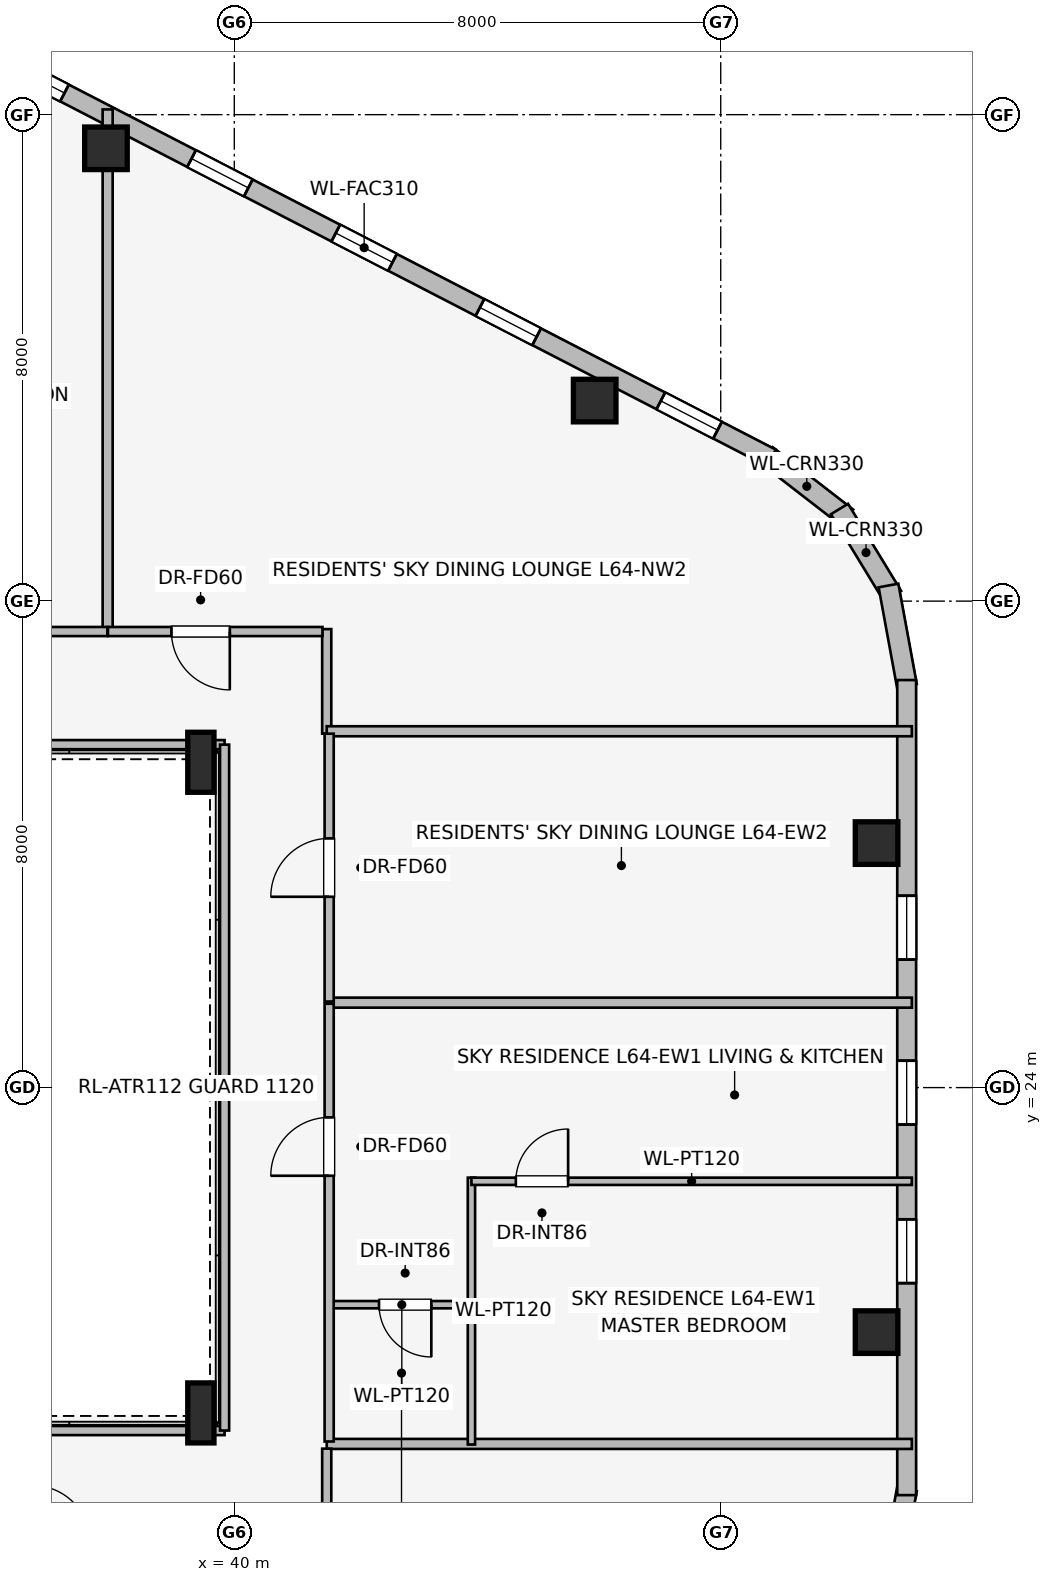
"""IFC4 building model, lengths in metres.
Left out: names, types, materials, properties, quantities, classifications, styles, units other than length and angle.
Written with IfcOpenShell. Run it as: python <this file> out.ifc"""

import sys

from ifc_helpers import new_model, si_unit, direction, frame, frame_2d, origin, origin_2d, place, context, subcontext, project, spatial, rectangle, i_section, extrude, element, fill, save


model = new_model("IFC4")
c1 = context("Model", 3, precision=1e-05, world=origin(), true_north=direction((0.0, 1.0)))
c2 = subcontext(c1, "Body", "Model", "MODEL_VIEW")
j1 = project(units=[si_unit("LENGTHUNIT", "METRE"), si_unit("PLANEANGLEUNIT", "RADIAN")], contexts=[c1])
p1 = place(None, origin())
s1 = spatial("IfcSite", under=j1, at=p1, CompositionType="ELEMENT")
p2 = place(p1, origin())
s2 = spatial("IfcBuilding", under=s1, at=p2, CompositionType="ELEMENT")
p3 = place(p2, frame((0.0, 0.0, 234.8)))
s3 = spatial("IfcBuildingStorey", under=s2, at=p3, CompositionType="ELEMENT", Elevation=234.8)
for number, where, z_axis, x_axis in (
    (1, (45.927, 35.298, 0.0), (0.0, 0.0, 1.0), (1.0, 0.0, 0.0)),
    (2, (37.889, 39.447, 0.0), (0.0, 0.0, 1.0), (1.0, 0.0, 0.0)),
    (3, (50.563, 19.979, 0.0), (0.0, 0.0, 1.0), (1.0, 0.0, 0.0)),
    (4, (50.563, 28.021, 0.0), (0.0, 0.0, 1.0), (1.0, 0.0, 0.0)),
):
    element("IfcColumn", number, at=place(p3, frame(where, z_axis=z_axis, x_axis=x_axis)), inside=s3, PredefinedType="COLUMN", context=c2, shape_type="SweptSolid", body=[
        extrude(rectangle(XDim=0.7, YDim=0.7, at=origin_2d()), origin(), (0.0, 0.0, 1.0), 3.55),
    ])
for number, where, z_axis, x_axis in (
    (5, (39.45, 18.65, 0.0), (0.0, 0.0, 1.0), (1.0, 0.0, 0.0)),
    (6, (39.45, 29.35, 0.0), (0.0, 0.0, 1.0), (1.0, 0.0, 0.0)),
):
    element("IfcColumn", number, at=place(p3, frame(where, z_axis=z_axis, x_axis=x_axis)), inside=s3, PredefinedType="COLUMN", context=c2, shape_type="SweptSolid", body=[
        extrude(i_section(OverallWidth=0.431, OverallDepth=0.987, WebThickness=0.034, FlangeThickness=0.062, at=origin_2d()), origin(), (0.0, 0.0, 1.0), 3.55),
    ])
p4 = place(p3, frame((48.753, 34.401, 0.0), z_axis=(0.0, 0.0, 1.0), x_axis=(0.790691856293, -0.61221433207, 0.0)))
e7 = element("IfcWall", 7, at=p4, inside=s3, PredefinedType="STANDARD", context=c2, shape_type="SweptSolid", body=[
    extrude(rectangle(XDim=1.676, YDim=0.33, at=frame_2d((0.838, 0.0))), origin(), (0.0, 0.0, 1.0), 3.26),
])
p5 = place(p3, frame((49.953, 33.515, 0.0), z_axis=(0.0, 0.0, 1.0), x_axis=(0.520325409202, -0.853968072318, 0.0)))
e8 = element("IfcWall", 8, at=p5, inside=s3, PredefinedType="STANDARD", context=c2, shape_type="SweptSolid", body=[
    extrude(rectangle(XDim=1.678, YDim=0.33, at=frame_2d((0.839, 0.0))), origin(), (0.0, 0.0, 1.0), 3.26),
])
p6 = place(p3, frame((50.759, 32.257, 0.0), z_axis=(0.0, 0.0, 1.0), x_axis=(0.180691763044, -0.983539773862, 0.0)))
e9 = element("IfcWall", 9, at=p6, inside=s3, PredefinedType="STANDARD", context=c2, shape_type="SweptSolid", body=[
    extrude(rectangle(XDim=1.677, YDim=0.33, at=frame_2d((0.838, 0.0))), origin(), (0.0, 0.0, 1.0), 3.26),
])
p7 = place(p3, frame((35.437, 41.27, 0.0), z_axis=(0.0, 0.0, 1.0), x_axis=(0.888581481622, -0.458718814218, 0.0)))
e10 = element("IfcWall", 10, at=p7, inside=s3, PredefinedType="STANDARD", context=c2, shape_type="SweptSolid", body=[
    extrude(rectangle(XDim=15.077, YDim=0.31, at=frame_2d((7.539, 0.0))), origin(), (0.0, 0.0, 1.0), 3.26),
])
p8 = place(p7, frame((0.942, 0.0, 0.75)))
e11 = element("IfcOpeningElement", 11, at=p8, cuts=e10, PredefinedType="OPENING", context=c2, shape_type="SweptSolid", body=[
    extrude(rectangle(XDim=1.05, YDim=1.4, at=frame_2d((0.525, 0.7))), frame((0.0, 0.165, 0.0), z_axis=(0.0, -1.0, 0.0), x_axis=(1.0, 0.0, 0.0)), (0.0, 0.0, 1.0), 0.33),
])
p9 = place(p7, frame((4.344, 0.0, 0.75)))
e12 = element("IfcOpeningElement", 12, at=p9, cuts=e10, PredefinedType="OPENING", context=c2, shape_type="SweptSolid", body=[
    extrude(rectangle(XDim=1.05, YDim=1.4, at=frame_2d((0.525, 0.7))), frame((0.0, 0.165, 0.0), z_axis=(0.0, -1.0, 0.0), x_axis=(1.0, 0.0, 0.0)), (0.0, 0.0, 1.0), 0.33),
])
p10 = place(p7, frame((7.013, 0.0, 0.75)))
e13 = element("IfcOpeningElement", 13, at=p10, cuts=e10, PredefinedType="OPENING", context=c2, shape_type="SweptSolid", body=[
    extrude(rectangle(XDim=1.05, YDim=1.4, at=frame_2d((0.525, 0.7))), frame((0.0, 0.165, 0.0), z_axis=(0.0, -1.0, 0.0), x_axis=(1.0, 0.0, 0.0)), (0.0, 0.0, 1.0), 0.33),
])
p11 = place(p7, frame((9.681, 0.0, 0.75)))
e14 = element("IfcOpeningElement", 14, at=p11, cuts=e10, PredefinedType="OPENING", context=c2, shape_type="SweptSolid", body=[
    extrude(rectangle(XDim=1.05, YDim=1.4, at=frame_2d((0.525, 0.7))), frame((0.0, 0.165, 0.0), z_axis=(0.0, -1.0, 0.0), x_axis=(1.0, 0.0, 0.0)), (0.0, 0.0, 1.0), 0.33),
])
p12 = place(p7, frame((13.029, 0.0, 0.75)))
e15 = element("IfcOpeningElement", 15, at=p12, cuts=e10, PredefinedType="OPENING", context=c2, shape_type="SweptSolid", body=[
    extrude(rectangle(XDim=1.05, YDim=1.4, at=frame_2d((0.525, 0.7))), frame((0.0, 0.165, 0.0), z_axis=(0.0, -1.0, 0.0), x_axis=(1.0, 0.0, 0.0)), (0.0, 0.0, 1.0), 0.33),
])
p13 = place(p3, frame((51.062, 17.392, 0.0), z_axis=(0.0, 0.0, 1.0), x_axis=(-0.180691763044, -0.983539773862, 0.0)))
e16 = element("IfcWall", 16, at=p13, inside=s3, PredefinedType="STANDARD", context=c2, shape_type="SweptSolid", body=[
    extrude(rectangle(XDim=1.677, YDim=0.33, at=frame_2d((0.838, 0.0))), origin(), (0.0, 0.0, 1.0), 3.26),
])
p14 = place(p3, frame((51.058, 30.702, 0.0), z_axis=(0.0, 0.0, 1.0), x_axis=(0.0, -1.0, 0.0)))
e17 = element("IfcWall", 17, at=p14, inside=s3, PredefinedType="STANDARD", context=c2, shape_type="SweptSolid", body=[
    extrude(rectangle(XDim=13.404, YDim=0.31, at=frame_2d((6.702, 0.0))), origin(), (0.0, 0.0, 1.0), 3.26),
])
p15 = place(p14, frame((3.547, 0.0, 0.75)))
e18 = element("IfcOpeningElement", 18, at=p15, cuts=e17, PredefinedType="OPENING", context=c2, shape_type="SweptSolid", body=[
    extrude(rectangle(XDim=1.05, YDim=1.4, at=frame_2d((0.525, 0.7))), frame((0.0, 0.165, 0.0), z_axis=(0.0, -1.0, 0.0), x_axis=(1.0, 0.0, 0.0)), (0.0, 0.0, 1.0), 0.33),
])
p16 = place(p14, frame((6.26, 0.0, 0.75)))
e19 = element("IfcOpeningElement", 19, at=p16, cuts=e17, PredefinedType="OPENING", context=c2, shape_type="SweptSolid", body=[
    extrude(rectangle(XDim=1.05, YDim=1.4, at=frame_2d((0.525, 0.7))), frame((0.0, 0.165, 0.0), z_axis=(0.0, -1.0, 0.0), x_axis=(1.0, 0.0, 0.0)), (0.0, 0.0, 1.0), 0.33),
])
p17 = place(p14, frame((8.868, 0.0, 0.75)))
e20 = element("IfcOpeningElement", 20, at=p17, cuts=e17, PredefinedType="OPENING", context=c2, shape_type="SweptSolid", body=[
    extrude(rectangle(XDim=1.05, YDim=1.4, at=frame_2d((0.525, 0.7))), frame((0.0, 0.165, 0.0), z_axis=(0.0, -1.0, 0.0), x_axis=(1.0, 0.0, 0.0)), (0.0, 0.0, 1.0), 0.33),
])
p18 = place(p3, frame((27.675, 18.36, 0.0), z_axis=(0.0, 0.0, 1.0), x_axis=(1.0, 0.0, 0.0)))
e21 = element("IfcWall", 21, at=p18, inside=s3, PredefinedType="PARTITIONING", context=c2, shape_type="SweptSolid", body=[
    extrude(rectangle(XDim=12.165, YDim=0.15, at=frame_2d((6.083, 0.0))), origin(), (0.0, 0.0, 1.0), 2.401),
])
p19 = place(p3, frame((39.84, 29.64, 0.0), z_axis=(0.0, 0.0, 1.0), x_axis=(-1.0, 0.0, 0.0)))
e22 = element("IfcWall", 22, at=p19, inside=s3, PredefinedType="PARTITIONING", context=c2, shape_type="SweptSolid", body=[
    extrude(rectangle(XDim=12.203, YDim=0.15, at=frame_2d((6.102, 0.0))), origin(), (0.0, 0.0, 1.0), 2.401),
])
p20 = place(p3, frame((39.84, 18.36, 0.0), z_axis=(0.0, 0.0, 1.0), x_axis=(0.0, 1.0, 0.0)))
e23 = element("IfcWall", 23, at=p20, inside=s3, PredefinedType="PARTITIONING", context=c2, shape_type="SweptSolid", body=[
    extrude(rectangle(XDim=11.28, YDim=0.15, at=frame_2d((5.64, 0.0))), origin(), (0.0, 0.0, 1.0), 3.26),
])
p21 = place(p3, frame((41.52, 29.82, 0.0), z_axis=(0.0, 0.0, 1.0), x_axis=(0.0, 1.0, 0.0)))
e24 = element("IfcWall", 24, at=p21, inside=s3, PredefinedType="PARTITIONING", context=c2, shape_type="SweptSolid", body=[
    extrude(rectangle(XDim=1.72, YDim=0.15, at=frame_2d((0.86, 0.0))), origin(), (0.0, 0.0, 1.0), 3.26),
])
p22 = place(p3, frame((37.917, 31.51, 0.0), z_axis=(0.0, 0.0, 1.0), x_axis=(0.0, 1.0, 0.0)))
e25 = element("IfcWall", 25, at=p22, inside=s3, PredefinedType="PARTITIONING", context=c2, shape_type="SweptSolid", body=[
    extrude(rectangle(XDim=8.576, YDim=0.165, at=frame_2d((4.288, 0.0))), origin(), (0.0, 0.0, 1.0), 2.649),
])
p23 = place(p3, frame((37.912, 31.5, 0.0), z_axis=(0.0, 0.0, 1.0), x_axis=(-1.0, 0.0, 0.0)))
e26 = element("IfcWall", 26, at=p23, inside=s3, PredefinedType="PARTITIONING", context=c2, shape_type="SweptSolid", body=[
    extrude(rectangle(XDim=3.622, YDim=0.15, at=frame_2d((1.811, 0.0))), origin(), (0.0, 0.0, 1.0), 3.26),
])
p24 = place(p23, frame((1.212, 0.0, 0.0)))
e27 = element("IfcOpeningElement", 27, at=p24, cuts=e26, PredefinedType="OPENING", context=c2, shape_type="SweptSolid", body=[
    extrude(rectangle(XDim=0.96, YDim=2.0, at=frame_2d((0.48, 1.0))), frame((0.0, 0.085, 0.0), z_axis=(0.0, -1.0, 0.0), x_axis=(1.0, 0.0, 0.0)), (0.0, 0.0, 1.0), 0.17),
])
p25 = place(p3, frame((41.45, 31.5, 0.0), z_axis=(0.0, 0.0, 1.0), x_axis=(-1.0, 0.0, 0.0)))
e28 = element("IfcWall", 28, at=p25, inside=s3, PredefinedType="PARTITIONING", context=c2, shape_type="SweptSolid", body=[
    extrude(rectangle(XDim=3.528, YDim=0.15, at=frame_2d((1.764, 0.0))), origin(), (0.0, 0.0, 1.0), 3.26),
])
p26 = place(p25, frame((1.524, 0.0, 0.0)))
e29 = element("IfcOpeningElement", 29, at=p26, cuts=e28, PredefinedType="OPENING", context=c2, shape_type="SweptSolid", body=[
    extrude(rectangle(XDim=0.96, YDim=2.0, at=frame_2d((0.48, 1.0))), frame((0.0, 0.085, 0.0), z_axis=(0.0, -1.0, 0.0), x_axis=(1.0, 0.0, 0.0)), (0.0, 0.0, 1.0), 0.17),
])
for number, where, z_axis, x_axis in (
    (30, (41.52, 18.14, 0.0), (0.0, 0.0, 1.0), (1.0, 0.0, 0.0)),
    (31, (41.52, 29.86, 0.0), (0.0, 0.0, 1.0), (1.0, 0.0, 0.0)),
):
    element("IfcWall", number, at=place(p3, frame(where, z_axis=z_axis, x_axis=x_axis)), inside=s3, PredefinedType="PARTITIONING", context=c2, shape_type="SweptSolid", body=[
        extrude(rectangle(XDim=9.623, YDim=0.165, at=frame_2d((4.812, 0.0))), origin(), (0.0, 0.0, 1.0), 3.26),
    ])
p27 = place(p3, frame((41.59, 25.397, 0.0), z_axis=(0.0, 0.0, 1.0), x_axis=(1.0, 0.0, 0.0)))
e32 = element("IfcWall", 32, at=p27, inside=s3, PredefinedType="PARTITIONING", context=c2, shape_type="SweptSolid", body=[
    extrude(rectangle(XDim=9.553, YDim=0.165, at=frame_2d((4.776, 0.0))), origin(), (0.0, 0.0, 1.0), 3.26),
])
p28 = place(p3, frame((43.9, 18.13, 0.0), z_axis=(0.0, 0.0, 1.0), x_axis=(0.0, 1.0, 0.0)))
e33 = element("IfcWall", 33, at=p28, inside=s3, PredefinedType="PARTITIONING", context=c2, shape_type="SweptSolid", body=[
    extrude(rectangle(XDim=4.389, YDim=0.12, at=frame_2d((2.195, 0.0))), origin(), (0.0, 0.0, 1.0), 3.26),
])
p29 = place(p3, frame((43.96, 20.43, 0.0), z_axis=(0.0, 0.0, 1.0), x_axis=(-1.0, 0.0, 0.0)))
e34 = element("IfcWall", 34, at=p29, inside=s3, PredefinedType="PARTITIONING", context=c2, shape_type="SweptSolid", body=[
    extrude(rectangle(XDim=2.41, YDim=0.12, at=frame_2d((1.205, 0.0))), origin(), (0.0, 0.0, 1.0), 3.26),
])
p30 = place(p29, frame((0.72, 0.0, 0.0)))
e35 = element("IfcOpeningElement", 35, at=p30, cuts=e34, PredefinedType="OPENING", context=c2, shape_type="SweptSolid", body=[
    extrude(rectangle(XDim=0.86, YDim=2.0, at=frame_2d((0.43, 1.0))), frame((0.0, 0.07, 0.0), z_axis=(0.0, -1.0, 0.0), x_axis=(1.0, 0.0, 0.0)), (0.0, 0.0, 1.0), 0.14),
])
p31 = place(p3, frame((43.9, 22.459, 0.0), z_axis=(0.0, 0.0, 1.0), x_axis=(1.0, 0.0, 0.0)))
e36 = element("IfcWall", 36, at=p31, inside=s3, PredefinedType="PARTITIONING", context=c2, shape_type="SweptSolid", body=[
    extrude(rectangle(XDim=7.243, YDim=0.12, at=frame_2d((3.622, 0.0))), origin(), (0.0, 0.0, 1.0), 3.26),
])
p32 = place(p31, frame((0.73, 0.0, 0.0)))
e37 = element("IfcOpeningElement", 37, at=p32, cuts=e36, PredefinedType="OPENING", context=c2, shape_type="SweptSolid", body=[
    extrude(rectangle(XDim=0.86, YDim=2.0, at=frame_2d((0.43, 1.0))), frame((0.0, 0.07, 0.0), z_axis=(0.0, -1.0, 0.0), x_axis=(1.0, 0.0, 0.0)), (0.0, 0.0, 1.0), 0.14),
])
p33 = place(p3, frame((41.56, 18.18, 0.0), z_axis=(0.0, 0.0, 1.0), x_axis=(0.0, 1.0, 0.0)))
e38 = element("IfcWall", 38, at=p33, inside=s3, PredefinedType="PARTITIONING", context=c2, shape_type="SweptSolid", body=[
    extrude(rectangle(XDim=7.199, YDim=0.15, at=frame_2d((3.6, 0.0))), origin(), (0.0, 0.0, 1.0), 3.26),
])
p34 = place(p33, frame((4.37, 0.0, 0.0)))
e39 = element("IfcOpeningElement", 39, at=p34, cuts=e38, PredefinedType="OPENING", context=c2, shape_type="SweptSolid", body=[
    extrude(rectangle(XDim=0.96, YDim=2.0, at=frame_2d((0.48, 1.0))), frame((0.0, 0.085, 0.0), z_axis=(0.0, -1.0, 0.0), x_axis=(1.0, 0.0, 0.0)), (0.0, 0.0, 1.0), 0.17),
])
p35 = place(p3, frame((41.56, 25.415, 0.0), z_axis=(0.0, 0.0, 1.0), x_axis=(0.0, 1.0, 0.0)))
e40 = element("IfcWall", 40, at=p35, inside=s3, PredefinedType="PARTITIONING", context=c2, shape_type="SweptSolid", body=[
    extrude(rectangle(XDim=4.405, YDim=0.15, at=frame_2d((2.203, 0.0))), origin(), (0.0, 0.0, 1.0), 3.26),
])
p36 = place(p35, frame((1.723, 0.0, 0.0)))
e41 = element("IfcOpeningElement", 41, at=p36, cuts=e40, PredefinedType="OPENING", context=c2, shape_type="SweptSolid", body=[
    extrude(rectangle(XDim=0.96, YDim=2.0, at=frame_2d((0.48, 1.0))), frame((0.0, 0.085, 0.0), z_axis=(0.0, -1.0, 0.0), x_axis=(1.0, 0.0, 0.0)), (0.0, 0.0, 1.0), 0.17),
])
p37 = place(p3, frame((41.52, 16.46, 0.0), z_axis=(0.0, 0.0, 1.0), x_axis=(0.0, 1.0, 0.0)))
e42 = element("IfcWall", 42, at=p37, inside=s3, PredefinedType="PARTITIONING", context=c2, shape_type="SweptSolid", body=[
    extrude(rectangle(XDim=1.602, YDim=0.15, at=frame_2d((0.801, 0.0))), origin(), (0.0, 0.0, 1.0), 3.26),
])
p38 = place(p8, origin())
e43 = element("IfcWindow", 43, at=p38, inside=s3, PartitioningType="SINGLE_PANEL", PredefinedType="WINDOW", context=c2, shape_type="SweptSolid", body=[
    extrude(rectangle(XDim=1.05, YDim=1.4, at=frame_2d((0.525, 0.7))), frame((0.0, 0.03, 0.0), z_axis=(0.0, -1.0, 0.0), x_axis=(1.0, 0.0, 0.0)), (0.0, 0.0, 1.0), 0.06),
])
fill(e11, e43)
p39 = place(p9, origin())
e44 = element("IfcWindow", 44, at=p39, inside=s3, PartitioningType="SINGLE_PANEL", PredefinedType="WINDOW", context=c2, shape_type="SweptSolid", body=[
    extrude(rectangle(XDim=1.05, YDim=1.4, at=frame_2d((0.525, 0.7))), frame((0.0, 0.03, 0.0), z_axis=(0.0, -1.0, 0.0), x_axis=(1.0, 0.0, 0.0)), (0.0, 0.0, 1.0), 0.06),
])
fill(e12, e44)
p40 = place(p10, origin())
e45 = element("IfcWindow", 45, at=p40, inside=s3, PartitioningType="SINGLE_PANEL", PredefinedType="WINDOW", context=c2, shape_type="SweptSolid", body=[
    extrude(rectangle(XDim=1.05, YDim=1.4, at=frame_2d((0.525, 0.7))), frame((0.0, 0.03, 0.0), z_axis=(0.0, -1.0, 0.0), x_axis=(1.0, 0.0, 0.0)), (0.0, 0.0, 1.0), 0.06),
])
fill(e13, e45)
p41 = place(p11, origin())
e46 = element("IfcWindow", 46, at=p41, inside=s3, PartitioningType="SINGLE_PANEL", PredefinedType="WINDOW", context=c2, shape_type="SweptSolid", body=[
    extrude(rectangle(XDim=1.05, YDim=1.4, at=frame_2d((0.525, 0.7))), frame((0.0, 0.03, 0.0), z_axis=(0.0, -1.0, 0.0), x_axis=(1.0, 0.0, 0.0)), (0.0, 0.0, 1.0), 0.06),
])
fill(e14, e46)
p42 = place(p12, origin())
e47 = element("IfcWindow", 47, at=p42, inside=s3, PartitioningType="SINGLE_PANEL", PredefinedType="WINDOW", context=c2, shape_type="SweptSolid", body=[
    extrude(rectangle(XDim=1.05, YDim=1.4, at=frame_2d((0.525, 0.7))), frame((0.0, 0.03, 0.0), z_axis=(0.0, -1.0, 0.0), x_axis=(1.0, 0.0, 0.0)), (0.0, 0.0, 1.0), 0.06),
])
fill(e15, e47)
p43 = place(p15, origin())
e48 = element("IfcWindow", 48, at=p43, inside=s3, PartitioningType="SINGLE_PANEL", PredefinedType="WINDOW", context=c2, shape_type="SweptSolid", body=[
    extrude(rectangle(XDim=1.05, YDim=1.4, at=frame_2d((0.525, 0.7))), frame((0.0, 0.03, 0.0), z_axis=(0.0, -1.0, 0.0), x_axis=(1.0, 0.0, 0.0)), (0.0, 0.0, 1.0), 0.06),
])
fill(e18, e48)
p44 = place(p16, origin())
e49 = element("IfcWindow", 49, at=p44, inside=s3, PartitioningType="SINGLE_PANEL", PredefinedType="WINDOW", context=c2, shape_type="SweptSolid", body=[
    extrude(rectangle(XDim=1.05, YDim=1.4, at=frame_2d((0.525, 0.7))), frame((0.0, 0.03, 0.0), z_axis=(0.0, -1.0, 0.0), x_axis=(1.0, 0.0, 0.0)), (0.0, 0.0, 1.0), 0.06),
])
fill(e19, e49)
p45 = place(p17, origin())
e50 = element("IfcWindow", 50, at=p45, inside=s3, PartitioningType="SINGLE_PANEL", PredefinedType="WINDOW", context=c2, shape_type="SweptSolid", body=[
    extrude(rectangle(XDim=1.05, YDim=1.4, at=frame_2d((0.525, 0.7))), frame((0.0, 0.03, 0.0), z_axis=(0.0, -1.0, 0.0), x_axis=(1.0, 0.0, 0.0)), (0.0, 0.0, 1.0), 0.06),
])
fill(e20, e50)
p46 = place(p26, origin())
e51 = element("IfcDoor", 51, at=p46, inside=s3, OperationType="SINGLE_SWING_LEFT", PredefinedType="DOOR", context=c2, shape_type="SweptSolid", body=[
    extrude(rectangle(XDim=0.96, YDim=2.0, at=frame_2d((0.48, 1.0))), frame((0.0, 0.025, 0.0), z_axis=(0.0, -1.0, 0.0), x_axis=(1.0, 0.0, 0.0)), (0.0, 0.0, 1.0), 0.05),
])
fill(e29, e51)
p47 = place(p30, origin())
e52 = element("IfcDoor", 52, at=p47, inside=s3, OperationType="SINGLE_SWING_LEFT", PredefinedType="DOOR", context=c2, shape_type="SweptSolid", body=[
    extrude(rectangle(XDim=0.86, YDim=2.0, at=frame_2d((0.43, 1.0))), frame((0.0, 0.025, 0.0), z_axis=(0.0, -1.0, 0.0), x_axis=(1.0, 0.0, 0.0)), (0.0, 0.0, 1.0), 0.05),
])
fill(e35, e52)
p48 = place(p32, origin())
e53 = element("IfcDoor", 53, at=p48, inside=s3, OperationType="SINGLE_SWING_RIGHT", PredefinedType="DOOR", context=c2, shape_type="SweptSolid", body=[
    extrude(rectangle(XDim=0.86, YDim=2.0, at=frame_2d((0.43, 1.0))), frame((0.0, 0.025, 0.0), z_axis=(0.0, -1.0, 0.0), x_axis=(1.0, 0.0, 0.0)), (0.0, 0.0, 1.0), 0.05),
])
fill(e37, e53)
p49 = place(p34, origin())
e54 = element("IfcDoor", 54, at=p49, inside=s3, OperationType="SINGLE_SWING_LEFT", PredefinedType="DOOR", context=c2, shape_type="SweptSolid", body=[
    extrude(rectangle(XDim=0.96, YDim=2.0, at=frame_2d((0.48, 1.0))), frame((0.0, 0.025, 0.0), z_axis=(0.0, -1.0, 0.0), x_axis=(1.0, 0.0, 0.0)), (0.0, 0.0, 1.0), 0.05),
])
fill(e39, e54)
p50 = place(p36, origin())
e55 = element("IfcDoor", 55, at=p50, inside=s3, OperationType="SINGLE_SWING_LEFT", PredefinedType="DOOR", context=c2, shape_type="SweptSolid", body=[
    extrude(rectangle(XDim=0.96, YDim=2.0, at=frame_2d((0.48, 1.0))), frame((0.0, 0.025, 0.0), z_axis=(0.0, -1.0, 0.0), x_axis=(1.0, 0.0, 0.0)), (0.0, 0.0, 1.0), 0.05),
])
fill(e41, e55)
save(model, sys.argv[1])
